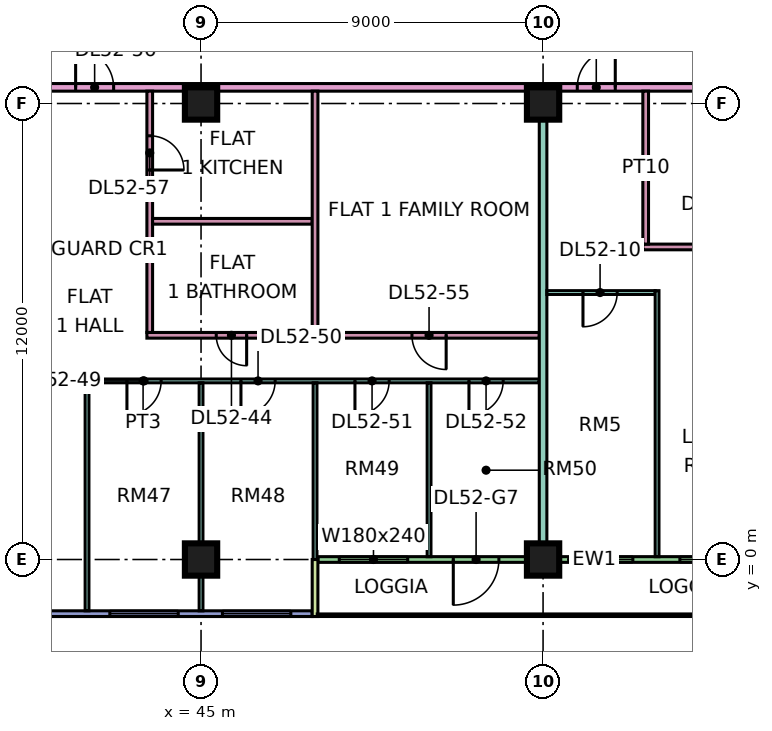
"""IFC4 building model, lengths in metres.
Left out: names, types, materials, properties, quantities, classifications, styles, units other than length and angle.
Written with IfcOpenShell. Run it as: python <this file> out.ifc"""

import sys

from ifc_helpers import new_model, si_unit, direction, frame, frame_2d, origin, origin_2d, place, context, subcontext, project, spatial, rectangle, extrude, element, fill, save


model = new_model("IFC4")
c1 = context("Model", 3, precision=1e-05, world=origin(), true_north=direction((0.0, 1.0)))
c2 = subcontext(c1, "Body", "Model", "MODEL_VIEW")
j1 = project(units=[si_unit("LENGTHUNIT", "METRE"), si_unit("PLANEANGLEUNIT", "RADIAN")], contexts=[c1])
p1 = place(None, origin())
s1 = spatial("IfcSite", under=j1, at=p1, CompositionType="ELEMENT")
p2 = place(p1, origin())
s2 = spatial("IfcBuilding", under=s1, at=p2, CompositionType="ELEMENT")
p3 = place(p2, frame((0.0, 0.0, 222.9)))
s3 = spatial("IfcBuildingStorey", under=s2, at=p3, CompositionType="ELEMENT", Elevation=222.9)
for number, where, z_axis, x_axis in (
    (1, (45.0, 0.0, 0.0), (0.0, 0.0, 1.0), (1.0, 0.0, 0.0)),
    (2, (45.0, 12.0, 0.0), (0.0, 0.0, 1.0), (1.0, 0.0, 0.0)),
    (3, (54.0, 0.0, 0.0), (0.0, 0.0, 1.0), (1.0, 0.0, 0.0)),
    (4, (54.0, 12.0, 0.0), (0.0, 0.0, 1.0), (1.0, 0.0, 0.0)),
):
    element("IfcColumn", number, at=place(p3, frame(where, z_axis=z_axis, x_axis=x_axis)), inside=s3, PredefinedType="COLUMN", context=c2, shape_type="SweptSolid", body=[
        extrude(rectangle(XDim=0.85, YDim=0.85, at=origin_2d()), origin(), (0.0, 0.0, 1.0), 3.75),
    ])
p4 = place(p3, frame((36.075, -1.425, 0.0), z_axis=(0.0, 0.0, 1.0), x_axis=(1.0, 0.0, 0.0)))
e5 = element("IfcWall", 5, at=p4, inside=s3, PredefinedType="SOLIDWALL", context=c2, shape_type="SweptSolid", body=[
    extrude(rectangle(XDim=11.85, YDim=0.15, at=frame_2d((5.925, 0.0))), origin(), (0.0, 0.0, 1.0), 3.35),
])
p5 = place(p4, frame((1.462, 0.0, 0.45)))
e6 = element("IfcOpeningElement", 6, at=p5, cuts=e5, PredefinedType="OPENING", context=c2, shape_type="SweptSolid", body=[
    extrude(rectangle(XDim=3.0, YDim=2.4, at=frame_2d((1.5, 1.2))), frame((0.0, 0.085, 0.0), z_axis=(0.0, -1.0, 0.0), x_axis=(1.0, 0.0, 0.0)), (0.0, 0.0, 1.0), 0.17),
])
p6 = place(p4, frame((6.525, 0.0, 0.45)))
e7 = element("IfcOpeningElement", 7, at=p6, cuts=e5, PredefinedType="OPENING", context=c2, shape_type="SweptSolid", body=[
    extrude(rectangle(XDim=1.8, YDim=2.4, at=frame_2d((0.9, 1.2))), frame((0.0, 0.085, 0.0), z_axis=(0.0, -1.0, 0.0), x_axis=(1.0, 0.0, 0.0)), (0.0, 0.0, 1.0), 0.17),
])
p7 = place(p4, frame((9.488, 0.0, 0.45)))
e8 = element("IfcOpeningElement", 8, at=p7, cuts=e5, PredefinedType="OPENING", context=c2, shape_type="SweptSolid", body=[
    extrude(rectangle(XDim=1.8, YDim=2.4, at=frame_2d((0.9, 1.2))), frame((0.0, 0.085, 0.0), z_axis=(0.0, -1.0, 0.0), x_axis=(1.0, 0.0, 0.0)), (0.0, 0.0, 1.0), 0.17),
])
p8 = place(p3, frame((48.075, 0.0, 0.0), z_axis=(0.0, 0.0, 1.0), x_axis=(1.0, 0.0, 0.0)))
e9 = element("IfcWall", 9, at=p8, inside=s3, PredefinedType="SOLIDWALL", context=c2, shape_type="SweptSolid", body=[
    extrude(rectangle(XDim=13.35, YDim=0.15, at=frame_2d((6.675, 0.0))), origin(), (0.0, 0.0, 1.0), 3.35),
])
p9 = place(p8, frame((0.562, 0.0, 0.45)))
e10 = element("IfcOpeningElement", 10, at=p9, cuts=e9, PredefinedType="OPENING", context=c2, shape_type="SweptSolid", body=[
    extrude(rectangle(XDim=1.8, YDim=2.4, at=frame_2d((0.9, 1.2))), frame((0.0, 0.085, 0.0), z_axis=(0.0, -1.0, 0.0), x_axis=(1.0, 0.0, 0.0)), (0.0, 0.0, 1.0), 0.17),
])
p10 = place(p8, frame((3.562, 0.0, 0.0)))
e11 = element("IfcOpeningElement", 11, at=p10, cuts=e9, PredefinedType="OPENING", context=c2, shape_type="SweptSolid", body=[
    extrude(rectangle(XDim=1.2, YDim=2.4, at=frame_2d((0.6, 1.2))), frame((0.0, 0.085, 0.0), z_axis=(0.0, -1.0, 0.0), x_axis=(1.0, 0.0, 0.0)), (0.0, 0.0, 1.0), 0.17),
])
p11 = place(p8, frame((7.087, 0.0, 0.45)))
e12 = element("IfcOpeningElement", 12, at=p11, cuts=e9, PredefinedType="OPENING", context=c2, shape_type="SweptSolid", body=[
    extrude(rectangle(XDim=1.2, YDim=2.4, at=frame_2d((0.6, 1.2))), frame((0.0, 0.085, 0.0), z_axis=(0.0, -1.0, 0.0), x_axis=(1.0, 0.0, 0.0)), (0.0, 0.0, 1.0), 0.17),
])
p12 = place(p8, frame((9.525, 0.0, 0.45)))
e13 = element("IfcOpeningElement", 13, at=p12, cuts=e9, PredefinedType="OPENING", context=c2, shape_type="SweptSolid", body=[
    extrude(rectangle(XDim=1.8, YDim=2.4, at=frame_2d((0.9, 1.2))), frame((0.0, 0.085, 0.0), z_axis=(0.0, -1.0, 0.0), x_axis=(1.0, 0.0, 0.0)), (0.0, 0.0, 1.0), 0.17),
])
p13 = place(p8, frame((12.188, 0.0, 0.45)))
e14 = element("IfcOpeningElement", 14, at=p13, cuts=e9, PredefinedType="OPENING", context=c2, shape_type="SweptSolid", body=[
    extrude(rectangle(XDim=0.9, YDim=2.4, at=frame_2d((0.45, 1.2))), frame((0.0, 0.085, 0.0), z_axis=(0.0, -1.0, 0.0), x_axis=(1.0, 0.0, 0.0)), (0.0, 0.0, 1.0), 0.17),
])
p14 = place(p3, frame((48.0, -1.5, 0.0), z_axis=(0.0, 0.0, 1.0), x_axis=(0.0, 1.0, 0.0)))
e15 = element("IfcWall", 15, at=p14, inside=s3, PredefinedType="SOLIDWALL", context=c2, shape_type="SweptSolid", body=[
    extrude(rectangle(XDim=1.5, YDim=0.15, at=frame_2d((0.75, 0.0))), origin(), (0.0, 0.0, 1.0), 3.35),
])
p15 = place(p3, frame((33.05, 4.7, 0.0), z_axis=(0.0, 0.0, 1.0), x_axis=(1.0, 0.0, 0.0)))
e16 = element("IfcWall", 16, at=p15, inside=s3, PredefinedType="PARTITIONING", context=c2, shape_type="SweptSolid", body=[
    extrude(rectangle(XDim=20.85, YDim=0.1, at=frame_2d((10.425, 0.0))), origin(), (0.0, 0.0, 1.0), 3.35),
])
p16 = place(p15, frame((10.0, 0.0, 0.0)))
e17 = element("IfcOpeningElement", 17, at=p16, cuts=e16, PredefinedType="OPENING", context=c2, shape_type="SweptSolid", body=[
    extrude(rectangle(XDim=0.9, YDim=2.1, at=frame_2d((0.45, 1.05))), frame((0.0, 0.06, 0.0), z_axis=(0.0, -1.0, 0.0), x_axis=(1.0, 0.0, 0.0)), (0.0, 0.0, 1.0), 0.12),
])
p17 = place(p15, frame((13.0, 0.0, 0.0)))
e18 = element("IfcOpeningElement", 18, at=p17, cuts=e16, PredefinedType="OPENING", context=c2, shape_type="SweptSolid", body=[
    extrude(rectangle(XDim=0.9, YDim=2.1, at=frame_2d((0.45, 1.05))), frame((0.0, 0.06, 0.0), z_axis=(0.0, -1.0, 0.0), x_axis=(1.0, 0.0, 0.0)), (0.0, 0.0, 1.0), 0.12),
])
p18 = place(p15, frame((16.0, 0.0, 0.0)))
e19 = element("IfcOpeningElement", 19, at=p18, cuts=e16, PredefinedType="OPENING", context=c2, shape_type="SweptSolid", body=[
    extrude(rectangle(XDim=0.9, YDim=2.1, at=frame_2d((0.45, 1.05))), frame((0.0, 0.06, 0.0), z_axis=(0.0, -1.0, 0.0), x_axis=(1.0, 0.0, 0.0)), (0.0, 0.0, 1.0), 0.12),
])
p19 = place(p15, frame((19.0, 0.0, 0.0)))
e20 = element("IfcOpeningElement", 20, at=p19, cuts=e16, PredefinedType="OPENING", context=c2, shape_type="SweptSolid", body=[
    extrude(rectangle(XDim=0.9, YDim=2.1, at=frame_2d((0.45, 1.05))), frame((0.0, 0.06, 0.0), z_axis=(0.0, -1.0, 0.0), x_axis=(1.0, 0.0, 0.0)), (0.0, 0.0, 1.0), 0.12),
])
p20 = place(p15, frame((4.0, 0.0, 0.0)))
e21 = element("IfcOpeningElement", 21, at=p20, cuts=e16, PredefinedType="OPENING", context=c2, shape_type="SweptSolid", body=[
    extrude(rectangle(XDim=0.9, YDim=2.1, at=frame_2d((0.45, 1.05))), frame((0.0, 0.06, 0.0), z_axis=(0.0, -1.0, 0.0), x_axis=(1.0, 0.0, 0.0)), (0.0, 0.0, 1.0), 0.12),
])
p21 = place(p3, frame((40.65, 12.425, 0.0), z_axis=(0.0, 0.0, 1.0), x_axis=(1.0, 0.0, 0.0)))
e22 = element("IfcWall", 22, at=p21, inside=s3, PredefinedType="PARTITIONING", context=c2, shape_type="SweptSolid", body=[
    extrude(rectangle(XDim=22.35, YDim=0.2, at=frame_2d((11.175, 0.0))), origin(), (0.0, 0.0, 1.0), 3.35),
])
p22 = place(p21, frame((14.25, 0.0, 0.0)))
e23 = element("IfcOpeningElement", 23, at=p22, cuts=e22, PredefinedType="OPENING", context=c2, shape_type="SweptSolid", body=[
    extrude(rectangle(XDim=1.0, YDim=2.1, at=frame_2d((0.5, 1.05))), frame((0.0, 0.11, 0.0), z_axis=(0.0, -1.0, 0.0), x_axis=(1.0, 0.0, 0.0)), (0.0, 0.0, 1.0), 0.22),
])
p23 = place(p21, frame((1.05, 0.0, 0.0)))
e24 = element("IfcOpeningElement", 24, at=p23, cuts=e22, PredefinedType="OPENING", context=c2, shape_type="SweptSolid", body=[
    extrude(rectangle(XDim=1.0, YDim=2.1, at=frame_2d((0.5, 1.05))), frame((0.0, 0.11, 0.0), z_axis=(0.0, -1.0, 0.0), x_axis=(1.0, 0.0, 0.0)), (0.0, 0.0, 1.0), 0.22),
])
p24 = place(p3, frame((42.0, -1.35, 0.0), z_axis=(0.0, 0.0, 1.0), x_axis=(0.0, 1.0, 0.0)))
e25 = element("IfcWall", 25, at=p24, inside=s3, PredefinedType="PARTITIONING", context=c2, shape_type="SweptSolid", body=[
    extrude(rectangle(XDim=6.0, YDim=0.1, at=frame_2d((3.0, 0.0))), origin(), (0.0, 0.0, 1.0), 3.35),
])
p25 = place(p3, frame((43.575, 5.9, 0.0), z_axis=(0.0, 0.0, 1.0), x_axis=(1.0, 0.0, 0.0)))
e26 = element("IfcWall", 26, at=p25, inside=s3, PredefinedType="PARTITIONING", context=c2, shape_type="SweptSolid", body=[
    extrude(rectangle(XDim=10.325, YDim=0.15, at=frame_2d((5.163, 0.0))), origin(), (0.0, 0.0, 1.0), 3.35),
])
p26 = place(p25, frame((1.825, 0.0, 0.0)))
e27 = element("IfcOpeningElement", 27, at=p26, cuts=e26, PredefinedType="OPENING", context=c2, shape_type="SweptSolid", body=[
    extrude(rectangle(XDim=0.8, YDim=2.1, at=frame_2d((0.4, 1.05))), frame((0.0, 0.085, 0.0), z_axis=(0.0, -1.0, 0.0), x_axis=(1.0, 0.0, 0.0)), (0.0, 0.0, 1.0), 0.17),
])
p27 = place(p25, frame((6.975, 0.0, 0.0)))
e28 = element("IfcOpeningElement", 28, at=p27, cuts=e26, PredefinedType="OPENING", context=c2, shape_type="SweptSolid", body=[
    extrude(rectangle(XDim=0.9, YDim=2.1, at=frame_2d((0.45, 1.05))), frame((0.0, 0.085, 0.0), z_axis=(0.0, -1.0, 0.0), x_axis=(1.0, 0.0, 0.0)), (0.0, 0.0, 1.0), 0.17),
])
p28 = place(p3, frame((43.65, 5.975, 0.0), z_axis=(0.0, 0.0, 1.0), x_axis=(0.0, 1.0, 0.0)))
e29 = element("IfcWall", 29, at=p28, inside=s3, PredefinedType="PARTITIONING", context=c2, shape_type="SweptSolid", body=[
    extrude(rectangle(XDim=6.35, YDim=0.15, at=frame_2d((3.175, 0.0))), origin(), (0.0, 0.0, 1.0), 3.35),
])
p29 = place(p28, frame((4.275, 0.0, 0.0)))
e30 = element("IfcOpeningElement", 30, at=p29, cuts=e29, PredefinedType="OPENING", context=c2, shape_type="SweptSolid", body=[
    extrude(rectangle(XDim=0.9, YDim=2.1, at=frame_2d((0.45, 1.05))), frame((0.0, 0.085, 0.0), z_axis=(0.0, -1.0, 0.0), x_axis=(1.0, 0.0, 0.0)), (0.0, 0.0, 1.0), 0.17),
])
p30 = place(p3, frame((43.725, 8.9, 0.0), z_axis=(0.0, 0.0, 1.0), x_axis=(1.0, 0.0, 0.0)))
e31 = element("IfcWall", 31, at=p30, inside=s3, PredefinedType="PARTITIONING", context=c2, shape_type="SweptSolid", body=[
    extrude(rectangle(XDim=4.2, YDim=0.15, at=frame_2d((2.1, 0.0))), origin(), (0.0, 0.0, 1.0), 3.35),
])
p31 = place(p3, frame((45.0, -1.351, 0.0), z_axis=(0.0, 0.0, 1.0), x_axis=(0.0, 1.0, 0.0)))
e32 = element("IfcWall", 32, at=p31, inside=s3, PredefinedType="PARTITIONING", context=c2, shape_type="SweptSolid", body=[
    extrude(rectangle(XDim=6.001, YDim=0.1, at=frame_2d((3.0, 0.0))), origin(), (0.0, 0.0, 1.0), 3.35),
])
p32 = place(p3, frame((48.0, 0.0, 0.0), z_axis=(0.0, 0.0, 1.0), x_axis=(0.0, 1.0, 0.0)))
e33 = element("IfcWall", 33, at=p32, inside=s3, PredefinedType="PARTITIONING", context=c2, shape_type="SweptSolid", body=[
    extrude(rectangle(XDim=4.65, YDim=0.1, at=frame_2d((2.325, 0.0))), origin(), (0.0, 0.0, 1.0), 3.35),
])
p33 = place(p3, frame((48.0, 5.975, 0.0), z_axis=(0.0, 0.0, 1.0), x_axis=(0.0, 1.0, 0.0)))
e34 = element("IfcWall", 34, at=p33, inside=s3, PredefinedType="PARTITIONING", context=c2, shape_type="SweptSolid", body=[
    extrude(rectangle(XDim=6.35, YDim=0.15, at=frame_2d((3.175, 0.0))), origin(), (0.0, 0.0, 1.0), 3.35),
])
p34 = place(p3, frame((51.0, 0.074, 0.0), z_axis=(0.0, 0.0, 1.0), x_axis=(0.0, 1.0, 0.0)))
e35 = element("IfcWall", 35, at=p34, inside=s3, PredefinedType="PARTITIONING", context=c2, shape_type="SweptSolid", body=[
    extrude(rectangle(XDim=4.576, YDim=0.1, at=frame_2d((2.288, 0.0))), origin(), (0.0, 0.0, 1.0), 3.35),
])
p35 = place(p3, frame((54.0, 0.074, 0.0), z_axis=(0.0, 0.0, 1.0), x_axis=(0.0, 1.0, 0.0)))
e36 = element("IfcWall", 36, at=p35, inside=s3, PredefinedType="PARTITIONING", context=c2, shape_type="SweptSolid", body=[
    extrude(rectangle(XDim=12.251, YDim=0.2, at=frame_2d((6.125, 0.0))), origin(), (0.0, 0.0, 1.0), 3.35),
])
p36 = place(p3, frame((54.1, 7.025, 0.0), z_axis=(0.0, 0.0, 1.0), x_axis=(1.0, 0.0, 0.0)))
e37 = element("IfcWall", 37, at=p36, inside=s3, PredefinedType="PARTITIONING", context=c2, shape_type="SweptSolid", body=[
    extrude(rectangle(XDim=2.85, YDim=0.1, at=frame_2d((1.425, 0.0))), origin(), (0.0, 0.0, 1.0), 3.35),
])
p37 = place(p36, frame((0.95, 0.0, 0.0)))
e38 = element("IfcOpeningElement", 38, at=p37, cuts=e37, PredefinedType="OPENING", context=c2, shape_type="SweptSolid", body=[
    extrude(rectangle(XDim=0.9, YDim=2.1, at=frame_2d((0.45, 1.05))), frame((0.0, 0.06, 0.0), z_axis=(0.0, -1.0, 0.0), x_axis=(1.0, 0.0, 0.0)), (0.0, 0.0, 1.0), 0.12),
])
p38 = place(p3, frame((56.625, 8.225, 0.0), z_axis=(0.0, 0.0, 1.0), x_axis=(1.0, 0.0, 0.0)))
e39 = element("IfcWall", 39, at=p38, inside=s3, PredefinedType="PARTITIONING", context=c2, shape_type="SweptSolid", body=[
    extrude(rectangle(XDim=6.301, YDim=0.15, at=frame_2d((3.15, 0.0))), origin(), (0.0, 0.0, 1.0), 3.35),
])
p39 = place(p38, frame((1.525, 0.0, 0.0)))
e40 = element("IfcOpeningElement", 40, at=p39, cuts=e39, PredefinedType="OPENING", context=c2, shape_type="SweptSolid", body=[
    extrude(rectangle(XDim=0.8, YDim=2.1, at=frame_2d((0.4, 1.05))), frame((0.0, 0.085, 0.0), z_axis=(0.0, -1.0, 0.0), x_axis=(1.0, 0.0, 0.0)), (0.0, 0.0, 1.0), 0.17),
])
p40 = place(p38, frame((4.575, 0.0, 0.0)))
e41 = element("IfcOpeningElement", 41, at=p40, cuts=e39, PredefinedType="OPENING", context=c2, shape_type="SweptSolid", body=[
    extrude(rectangle(XDim=0.9, YDim=2.1, at=frame_2d((0.45, 1.05))), frame((0.0, 0.085, 0.0), z_axis=(0.0, -1.0, 0.0), x_axis=(1.0, 0.0, 0.0)), (0.0, 0.0, 1.0), 0.17),
])
p41 = place(p3, frame((56.7, 8.3, 0.0), z_axis=(0.0, 0.0, 1.0), x_axis=(0.0, 1.0, 0.0)))
e42 = element("IfcWall", 42, at=p41, inside=s3, PredefinedType="PARTITIONING", context=c2, shape_type="SweptSolid", body=[
    extrude(rectangle(XDim=4.025, YDim=0.15, at=frame_2d((2.012, 0.0))), origin(), (0.0, 0.0, 1.0), 3.35),
])
p42 = place(p3, frame((57.0, 0.074, 0.0), z_axis=(0.0, 0.0, 1.0), x_axis=(0.0, 1.0, 0.0)))
e43 = element("IfcWall", 43, at=p42, inside=s3, PredefinedType="PARTITIONING", context=c2, shape_type="SweptSolid", body=[
    extrude(rectangle(XDim=7.001, YDim=0.1, at=frame_2d((3.5, 0.0))), origin(), (0.0, 0.0, 1.0), 3.35),
])
p43 = place(p6, origin())
e44 = element("IfcWindow", 44, at=p43, inside=s3, PartitioningType="SINGLE_PANEL", PredefinedType="WINDOW", context=c2, shape_type="SweptSolid", body=[
    extrude(rectangle(XDim=1.8, YDim=2.4, at=frame_2d((0.9, 1.2))), frame((0.0, 0.03, 0.0), z_axis=(0.0, -1.0, 0.0), x_axis=(1.0, 0.0, 0.0)), (0.0, 0.0, 1.0), 0.06),
])
fill(e7, e44)
p44 = place(p7, origin())
e45 = element("IfcWindow", 45, at=p44, inside=s3, PartitioningType="SINGLE_PANEL", PredefinedType="WINDOW", context=c2, shape_type="SweptSolid", body=[
    extrude(rectangle(XDim=1.8, YDim=2.4, at=frame_2d((0.9, 1.2))), frame((0.0, 0.03, 0.0), z_axis=(0.0, -1.0, 0.0), x_axis=(1.0, 0.0, 0.0)), (0.0, 0.0, 1.0), 0.06),
])
fill(e8, e45)
p45 = place(p9, origin())
e46 = element("IfcWindow", 46, at=p45, inside=s3, PartitioningType="SINGLE_PANEL", PredefinedType="WINDOW", context=c2, shape_type="SweptSolid", body=[
    extrude(rectangle(XDim=1.8, YDim=2.4, at=frame_2d((0.9, 1.2))), frame((0.0, 0.03, 0.0), z_axis=(0.0, -1.0, 0.0), x_axis=(1.0, 0.0, 0.0)), (0.0, 0.0, 1.0), 0.06),
])
fill(e10, e46)
p46 = place(p10, frame((1.2, 0.0, 0.0), z_axis=(0.0, 0.0, 1.0), x_axis=(-1.0, 0.0, 0.0)))
e47 = element("IfcDoor", 47, at=p46, inside=s3, OperationType="DOUBLE_DOOR_SINGLE_SWING", PredefinedType="DOOR", context=c2, shape_type="SweptSolid", body=[
    extrude(rectangle(XDim=1.2, YDim=2.4, at=frame_2d((0.6, 1.2))), frame((0.0, 0.025, 0.0), z_axis=(0.0, -1.0, 0.0), x_axis=(1.0, 0.0, 0.0)), (0.0, 0.0, 1.0), 0.05),
])
fill(e11, e47)
p47 = place(p11, origin())
e48 = element("IfcWindow", 48, at=p47, inside=s3, PartitioningType="SINGLE_PANEL", PredefinedType="WINDOW", context=c2, shape_type="SweptSolid", body=[
    extrude(rectangle(XDim=1.2, YDim=2.4, at=frame_2d((0.6, 1.2))), frame((0.0, 0.03, 0.0), z_axis=(0.0, -1.0, 0.0), x_axis=(1.0, 0.0, 0.0)), (0.0, 0.0, 1.0), 0.06),
])
fill(e12, e48)
p48 = place(p12, origin())
e49 = element("IfcWindow", 49, at=p48, inside=s3, PartitioningType="SINGLE_PANEL", PredefinedType="WINDOW", context=c2, shape_type="SweptSolid", body=[
    extrude(rectangle(XDim=1.8, YDim=2.4, at=frame_2d((0.9, 1.2))), frame((0.0, 0.03, 0.0), z_axis=(0.0, -1.0, 0.0), x_axis=(1.0, 0.0, 0.0)), (0.0, 0.0, 1.0), 0.06),
])
fill(e13, e49)
p49 = place(p37, frame((0.9, 0.0, 0.0), z_axis=(0.0, 0.0, 1.0), x_axis=(-1.0, 0.0, 0.0)))
e50 = element("IfcDoor", 50, at=p49, inside=s3, OperationType="SINGLE_SWING_LEFT", PredefinedType="DOOR", context=c2, shape_type="SweptSolid", body=[
    extrude(rectangle(XDim=0.9, YDim=2.1, at=frame_2d((0.45, 1.05))), frame((0.0, 0.025, 0.0), z_axis=(0.0, -1.0, 0.0), x_axis=(1.0, 0.0, 0.0)), (0.0, 0.0, 1.0), 0.05),
])
fill(e38, e50)
p50 = place(p22, frame((1.0, 0.0, 0.0), z_axis=(0.0, 0.0, 1.0), x_axis=(-1.0, 0.0, 0.0)))
e51 = element("IfcDoor", 51, at=p50, inside=s3, OperationType="SINGLE_SWING_RIGHT", PredefinedType="DOOR", context=c2, shape_type="SweptSolid", body=[
    extrude(rectangle(XDim=1.0, YDim=2.1, at=frame_2d((0.5, 1.05))), frame((0.0, 0.025, 0.0), z_axis=(0.0, -1.0, 0.0), x_axis=(1.0, 0.0, 0.0)), (0.0, 0.0, 1.0), 0.05),
])
fill(e23, e51)
p51 = place(p26, origin())
e52 = element("IfcDoor", 52, at=p51, inside=s3, OperationType="SINGLE_SWING_RIGHT", PredefinedType="DOOR", context=c2, shape_type="SweptSolid", body=[
    extrude(rectangle(XDim=0.8, YDim=2.1, at=frame_2d((0.4, 1.05))), frame((0.0, 0.025, 0.0), z_axis=(0.0, -1.0, 0.0), x_axis=(1.0, 0.0, 0.0)), (0.0, 0.0, 1.0), 0.05),
])
fill(e27, e52)
p52 = place(p16, frame((0.9, 0.0, 0.0), z_axis=(0.0, 0.0, 1.0), x_axis=(-1.0, 0.0, 0.0)))
e53 = element("IfcDoor", 53, at=p52, inside=s3, OperationType="SINGLE_SWING_LEFT", PredefinedType="DOOR", context=c2, shape_type="SweptSolid", body=[
    extrude(rectangle(XDim=0.9, YDim=2.1, at=frame_2d((0.45, 1.05))), frame((0.0, 0.025, 0.0), z_axis=(0.0, -1.0, 0.0), x_axis=(1.0, 0.0, 0.0)), (0.0, 0.0, 1.0), 0.05),
])
fill(e17, e53)
p53 = place(p17, frame((0.9, 0.0, 0.0), z_axis=(0.0, 0.0, 1.0), x_axis=(-1.0, 0.0, 0.0)))
e54 = element("IfcDoor", 54, at=p53, inside=s3, OperationType="SINGLE_SWING_LEFT", PredefinedType="DOOR", context=c2, shape_type="SweptSolid", body=[
    extrude(rectangle(XDim=0.9, YDim=2.1, at=frame_2d((0.45, 1.05))), frame((0.0, 0.025, 0.0), z_axis=(0.0, -1.0, 0.0), x_axis=(1.0, 0.0, 0.0)), (0.0, 0.0, 1.0), 0.05),
])
fill(e18, e54)
p54 = place(p18, frame((0.9, 0.0, 0.0), z_axis=(0.0, 0.0, 1.0), x_axis=(-1.0, 0.0, 0.0)))
e55 = element("IfcDoor", 55, at=p54, inside=s3, OperationType="SINGLE_SWING_LEFT", PredefinedType="DOOR", context=c2, shape_type="SweptSolid", body=[
    extrude(rectangle(XDim=0.9, YDim=2.1, at=frame_2d((0.45, 1.05))), frame((0.0, 0.025, 0.0), z_axis=(0.0, -1.0, 0.0), x_axis=(1.0, 0.0, 0.0)), (0.0, 0.0, 1.0), 0.05),
])
fill(e19, e55)
p55 = place(p19, frame((0.9, 0.0, 0.0), z_axis=(0.0, 0.0, 1.0), x_axis=(-1.0, 0.0, 0.0)))
e56 = element("IfcDoor", 56, at=p55, inside=s3, OperationType="SINGLE_SWING_LEFT", PredefinedType="DOOR", context=c2, shape_type="SweptSolid", body=[
    extrude(rectangle(XDim=0.9, YDim=2.1, at=frame_2d((0.45, 1.05))), frame((0.0, 0.025, 0.0), z_axis=(0.0, -1.0, 0.0), x_axis=(1.0, 0.0, 0.0)), (0.0, 0.0, 1.0), 0.05),
])
fill(e20, e56)
p56 = place(p27, origin())
e57 = element("IfcDoor", 57, at=p56, inside=s3, OperationType="SINGLE_SWING_RIGHT", PredefinedType="DOOR", context=c2, shape_type="SweptSolid", body=[
    extrude(rectangle(XDim=0.9, YDim=2.1, at=frame_2d((0.45, 1.05))), frame((0.0, 0.025, 0.0), z_axis=(0.0, -1.0, 0.0), x_axis=(1.0, 0.0, 0.0)), (0.0, 0.0, 1.0), 0.05),
])
fill(e28, e57)
p57 = place(p23, origin())
e58 = element("IfcDoor", 58, at=p57, inside=s3, OperationType="SINGLE_SWING_LEFT", PredefinedType="DOOR", context=c2, shape_type="SweptSolid", body=[
    extrude(rectangle(XDim=1.0, YDim=2.1, at=frame_2d((0.5, 1.05))), frame((0.0, 0.025, 0.0), z_axis=(0.0, -1.0, 0.0), x_axis=(1.0, 0.0, 0.0)), (0.0, 0.0, 1.0), 0.05),
])
fill(e24, e58)
p58 = place(p29, frame((0.9, 0.0, 0.0), z_axis=(0.0, 0.0, 1.0), x_axis=(-1.0, 0.0, 0.0)))
e59 = element("IfcDoor", 59, at=p58, inside=s3, OperationType="SINGLE_SWING_LEFT", PredefinedType="DOOR", context=c2, shape_type="SweptSolid", body=[
    extrude(rectangle(XDim=0.9, YDim=2.1, at=frame_2d((0.45, 1.05))), frame((0.0, 0.025, 0.0), z_axis=(0.0, -1.0, 0.0), x_axis=(1.0, 0.0, 0.0)), (0.0, 0.0, 1.0), 0.05),
])
fill(e30, e59)
save(model, sys.argv[1])
